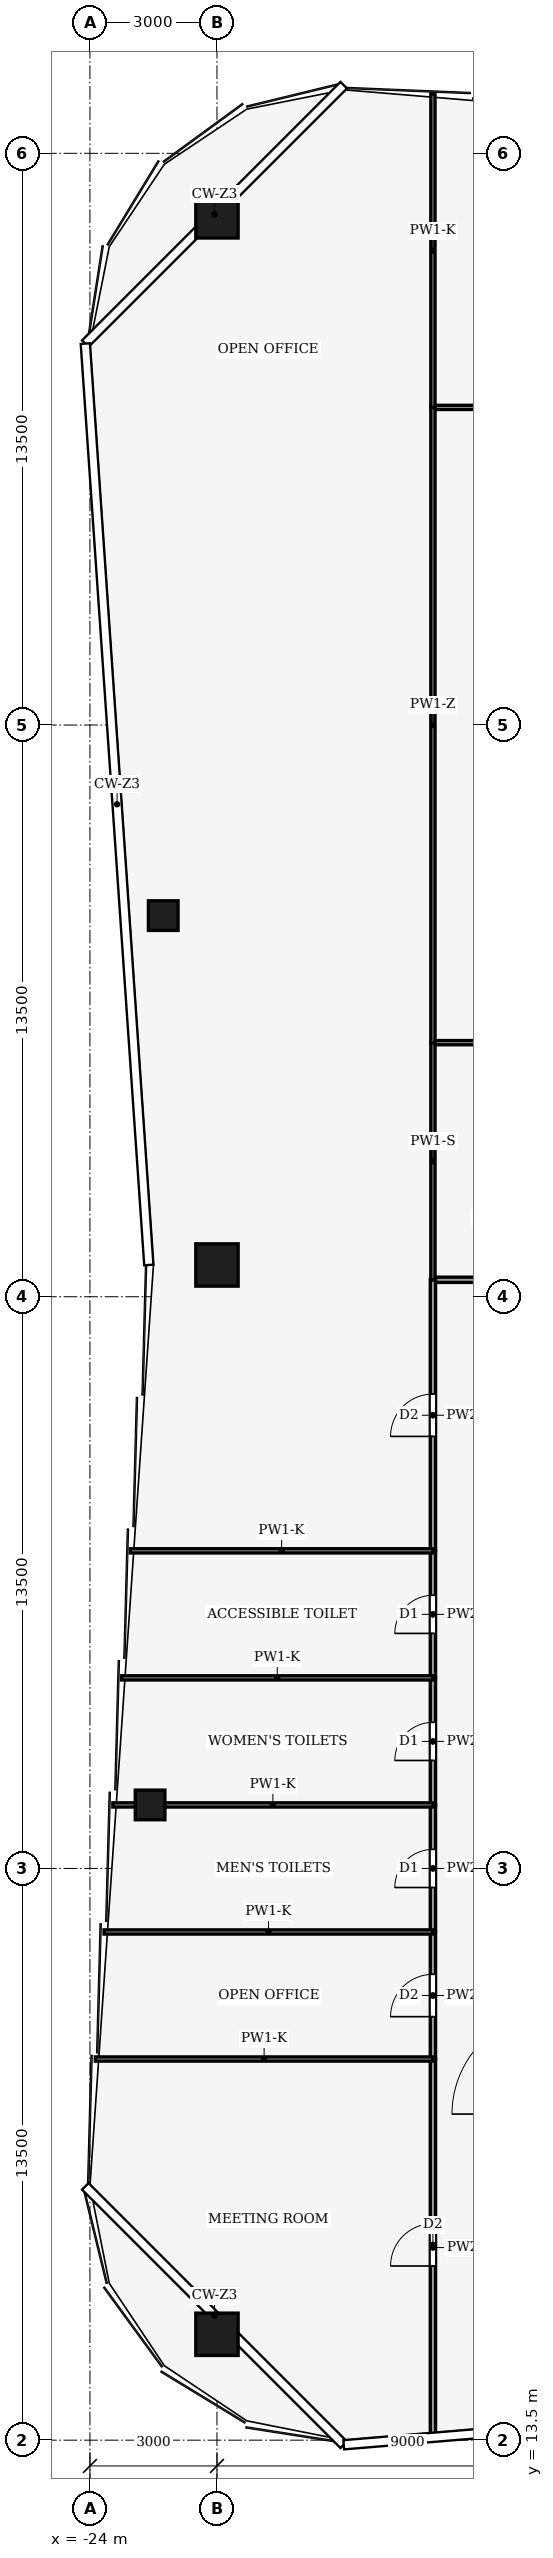
"""IFC4 building model, lengths in metres.
Left out: names, types, materials, properties, quantities, classifications, styles, units other than length and angle.
Written with IfcOpenShell. Run it as: python <this file> out.ifc"""

import sys

from ifc_helpers import new_model, si_unit, direction, frame, frame_2d, origin, origin_2d, place, context, subcontext, project, spatial, rectangle, hollow_rectangle, extrude, element, fill, save


model = new_model("IFC4")
c1 = context("Model", 3, precision=1e-05, world=origin(), true_north=direction((0.0, 1.0)))
c2 = subcontext(c1, "Body", "Model", "MODEL_VIEW")
j1 = project(units=[si_unit("LENGTHUNIT", "METRE"), si_unit("PLANEANGLEUNIT", "RADIAN")], contexts=[c1])
p1 = place(None, origin())
s1 = spatial("IfcSite", under=j1, at=p1, CompositionType="ELEMENT")
p2 = place(p1, origin())
s2 = spatial("IfcBuilding", under=s1, at=p2, CompositionType="ELEMENT")
p3 = place(p2, frame((0.0, 0.0, 222.0)))
s3 = spatial("IfcBuildingStorey", under=s2, at=p3, CompositionType="ELEMENT", Elevation=222.0)
for number, where, z_axis, x_axis in (
    (1, (-21.0, 66.0, 0.0), (0.0, 0.0, 1.0), (1.0, 0.0, 0.0)),
    (2, (-21.0, 16.0, 0.0), (0.0, 0.0, 1.0), (1.0, 0.0, 0.0)),
    (3, (-21.0, 41.25, 0.0), (0.0, 0.0, 1.0), (1.0, 0.0, 0.0)),
):
    element("IfcColumn", number, at=place(p3, frame(where, z_axis=z_axis, x_axis=x_axis)), inside=s3, PredefinedType="COLUMN", context=c2, shape_type="SweptSolid", body=[
        extrude(hollow_rectangle(XDim=1.0, YDim=1.0, WallThickness=0.06, at=origin_2d()), origin(), (0.0, 0.0, 1.0), 4.0),
    ])
for number, where, z_axis, x_axis in (
    (4, (-22.579, 28.5, 0.0), (0.0, 0.0, 1.0), (1.0, 0.0, 0.0)),
    (5, (-22.269, 49.5, 0.0), (0.0, 0.0, 1.0), (1.0, 0.0, 0.0)),
):
    element("IfcColumn", number, at=place(p3, frame(where, z_axis=z_axis, x_axis=x_axis)), inside=s3, PredefinedType="COLUMN", context=c2, shape_type="SweptSolid", body=[
        extrude(hollow_rectangle(XDim=0.7, YDim=0.7, WallThickness=0.03, at=origin_2d()), origin(), (0.0, 0.0, 1.0), 4.0),
    ])
p4 = place(p3, frame((-15.9, 40.9, 0.0), z_axis=(0.0, 0.0, 1.0), x_axis=(1.0, 0.0, 0.0)))
e6 = element("IfcWall", 6, at=p4, inside=s3, PredefinedType="PARTITIONING", context=c2, shape_type="SweptSolid", body=[
    extrude(rectangle(XDim=3.9, YDim=0.125, at=frame_2d((1.95, 0.0))), origin(), (0.0, 0.0, 1.0), 3.32),
])
p5 = place(p4, frame((1.45, 0.0, 0.0)))
e7 = element("IfcOpeningElement", 7, at=p5, cuts=e6, PredefinedType="OPENING", context=c2, shape_type="SweptSolid", body=[
    extrude(rectangle(XDim=1.0, YDim=2.1, at=frame_2d((0.5, 1.05))), frame((0.0, 0.073, 0.0), z_axis=(0.0, -1.0, 0.0), x_axis=(1.0, 0.0, 0.0)), (0.0, 0.0, 1.0), 0.145),
])
p6 = place(p3, frame((-15.9, 13.595, 0.0), z_axis=(0.0, 0.0, 1.0), x_axis=(0.0, 1.0, 0.0)))
e8 = element("IfcWall", 8, at=p6, inside=s3, PredefinedType="PARTITIONING", context=c2, shape_type="SweptSolid", body=[
    extrude(rectangle(XDim=8.905, YDim=0.125, at=frame_2d((4.453, 0.0))), origin(), (0.0, 0.0, 1.0), 2.92),
])
p7 = place(p6, frame((4.018, 0.0, 0.0)))
e9 = element("IfcOpeningElement", 9, at=p7, cuts=e8, PredefinedType="OPENING", context=c2, shape_type="SweptSolid", body=[
    extrude(rectangle(XDim=1.0, YDim=2.1, at=frame_2d((0.5, 1.05))), frame((0.0, 0.073, 0.0), z_axis=(0.0, -1.0, 0.0), x_axis=(1.0, 0.0, 0.0)), (0.0, 0.0, 1.0), 0.145),
])
p8 = place(p3, frame((-15.9, 22.5, 0.0), z_axis=(0.0, 0.0, 1.0), x_axis=(0.0, 1.0, 0.0)))
e10 = element("IfcWall", 10, at=p8, inside=s3, PredefinedType="PARTITIONING", context=c2, shape_type="SweptSolid", body=[
    extrude(rectangle(XDim=3.0, YDim=0.125, at=frame_2d((1.5, 0.0))), origin(), (0.0, 0.0, 1.0), 3.32),
])
p9 = place(p8, frame((1.0, 0.0, 0.0)))
e11 = element("IfcOpeningElement", 11, at=p9, cuts=e10, PredefinedType="OPENING", context=c2, shape_type="SweptSolid", body=[
    extrude(rectangle(XDim=1.0, YDim=2.1, at=frame_2d((0.5, 1.05))), frame((0.0, 0.073, 0.0), z_axis=(0.0, -1.0, 0.0), x_axis=(1.0, 0.0, 0.0)), (0.0, 0.0, 1.0), 0.145),
])
p10 = place(p3, frame((-15.9, 25.5, 0.0), z_axis=(0.0, 0.0, 1.0), x_axis=(0.0, 1.0, 0.0)))
e12 = element("IfcWall", 12, at=p10, inside=s3, PredefinedType="PARTITIONING", context=c2, shape_type="SweptSolid", body=[
    extrude(rectangle(XDim=3.0, YDim=0.125, at=frame_2d((1.5, 0.0))), origin(), (0.0, 0.0, 1.0), 3.75),
])
p11 = place(p10, frame((1.05, 0.0, 0.0)))
e13 = element("IfcOpeningElement", 13, at=p11, cuts=e12, PredefinedType="OPENING", context=c2, shape_type="SweptSolid", body=[
    extrude(rectangle(XDim=0.9, YDim=2.1, at=frame_2d((0.45, 1.05))), frame((0.0, 0.073, 0.0), z_axis=(0.0, -1.0, 0.0), x_axis=(1.0, 0.0, 0.0)), (0.0, 0.0, 1.0), 0.145),
])
p12 = place(p3, frame((-15.9, 28.5, 0.0), z_axis=(0.0, 0.0, 1.0), x_axis=(0.0, 1.0, 0.0)))
e14 = element("IfcWall", 14, at=p12, inside=s3, PredefinedType="PARTITIONING", context=c2, shape_type="SweptSolid", body=[
    extrude(rectangle(XDim=3.0, YDim=0.125, at=frame_2d((1.5, 0.0))), origin(), (0.0, 0.0, 1.0), 3.75),
])
p13 = place(p12, frame((1.05, 0.0, 0.0)))
e15 = element("IfcOpeningElement", 15, at=p13, cuts=e14, PredefinedType="OPENING", context=c2, shape_type="SweptSolid", body=[
    extrude(rectangle(XDim=0.9, YDim=2.1, at=frame_2d((0.45, 1.05))), frame((0.0, 0.073, 0.0), z_axis=(0.0, -1.0, 0.0), x_axis=(1.0, 0.0, 0.0)), (0.0, 0.0, 1.0), 0.145),
])
p14 = place(p3, frame((-15.9, 31.5, 0.0), z_axis=(0.0, 0.0, 1.0), x_axis=(0.0, 1.0, 0.0)))
e16 = element("IfcWall", 16, at=p14, inside=s3, PredefinedType="PARTITIONING", context=c2, shape_type="SweptSolid", body=[
    extrude(rectangle(XDim=3.0, YDim=0.125, at=frame_2d((1.5, 0.0))), origin(), (0.0, 0.0, 1.0), 3.75),
])
p15 = place(p14, frame((1.05, 0.0, 0.0)))
e17 = element("IfcOpeningElement", 17, at=p15, cuts=e16, PredefinedType="OPENING", context=c2, shape_type="SweptSolid", body=[
    extrude(rectangle(XDim=0.9, YDim=2.1, at=frame_2d((0.45, 1.05))), frame((0.0, 0.073, 0.0), z_axis=(0.0, -1.0, 0.0), x_axis=(1.0, 0.0, 0.0)), (0.0, 0.0, 1.0), 0.145),
])
p16 = place(p3, frame((-15.9, 34.5, 0.0), z_axis=(0.0, 0.0, 1.0), x_axis=(0.0, 1.0, 0.0)))
e18 = element("IfcWall", 18, at=p16, inside=s3, PredefinedType="PARTITIONING", context=c2, shape_type="SweptSolid", body=[
    extrude(rectangle(XDim=6.404, YDim=0.125, at=frame_2d((3.202, 0.0))), origin(), (0.0, 0.0, 1.0), 3.02),
])
p17 = place(p16, frame((2.702, 0.0, 0.0)))
e19 = element("IfcOpeningElement", 19, at=p17, cuts=e18, PredefinedType="OPENING", context=c2, shape_type="SweptSolid", body=[
    extrude(rectangle(XDim=1.0, YDim=2.1, at=frame_2d((0.5, 1.05))), frame((0.0, 0.073, 0.0), z_axis=(0.0, -1.0, 0.0), x_axis=(1.0, 0.0, 0.0)), (0.0, 0.0, 1.0), 0.145),
])
p18 = place(p3, frame((-11.996, 46.5, 0.0), z_axis=(0.0, 0.0, 1.0), x_axis=(-1.0, 0.0, 0.0)))
e20 = element("IfcWall", 20, at=p18, inside=s3, PredefinedType="PARTITIONING", context=c2, shape_type="SweptSolid", body=[
    extrude(rectangle(XDim=3.904, YDim=0.1, at=frame_2d((1.952, 0.0))), origin(), (0.0, 0.0, 1.0), 3.75),
])
p19 = place(p3, frame((-15.9, 46.504, 0.0), z_axis=(0.0, 0.0, 1.0), x_axis=(0.0, -1.0, 0.0)))
e21 = element("IfcWall", 21, at=p19, inside=s3, PredefinedType="PARTITIONING", context=c2, shape_type="SweptSolid", body=[
    extrude(rectangle(XDim=5.608, YDim=0.1, at=frame_2d((2.804, 0.0))), origin(), (0.0, 0.0, 1.0), 3.32),
])
p20 = place(p3, frame((-15.9, 61.5, 0.0), z_axis=(0.0, 0.0, 1.0), x_axis=(1.0, 0.0, 0.0)))
e22 = element("IfcWall", 22, at=p20, inside=s3, PredefinedType="PARTITIONING", context=c2, shape_type="SweptSolid", body=[
    extrude(rectangle(XDim=9.9, YDim=0.1, at=frame_2d((4.95, 0.0))), origin(), (0.0, 0.0, 1.0), 3.12),
])
p21 = place(p20, frame((4.45, 0.0, 0.0)))
e23 = element("IfcOpeningElement", 23, at=p21, cuts=e22, PredefinedType="OPENING", context=c2, shape_type="SweptSolid", body=[
    extrude(rectangle(XDim=1.0, YDim=2.1, at=frame_2d((0.5, 1.05))), frame((0.0, 0.06, 0.0), z_axis=(0.0, -1.0, 0.0), x_axis=(1.0, 0.0, 0.0)), (0.0, 0.0, 1.0), 0.12),
])
p22 = place(p3, frame((-15.9, 61.504, 0.0), z_axis=(0.0, 0.0, 1.0), x_axis=(0.0, -1.0, 0.0)))
e24 = element("IfcWall", 24, at=p22, inside=s3, PredefinedType="PARTITIONING", context=c2, shape_type="SweptSolid", body=[
    extrude(rectangle(XDim=15.008, YDim=0.1, at=frame_2d((7.504, 0.0))), origin(), (0.0, 0.0, 1.0), 3.12),
])
p23 = place(p3, frame((-15.9, 68.905, 0.0), z_axis=(0.0, 0.0, 1.0), x_axis=(0.0, -1.0, 0.0)))
e25 = element("IfcWall", 25, at=p23, inside=s3, PredefinedType="PARTITIONING", context=c2, shape_type="SweptSolid", body=[
    extrude(rectangle(XDim=7.409, YDim=0.1, at=frame_2d((3.705, 0.0))), origin(), (0.0, 0.0, 1.0), 2.92),
])
p24 = place(p3, frame((-15.9, 22.5, 0.0), z_axis=(0.0, 0.0, 1.0), x_axis=(-1.0, 0.0, 0.0)))
e26 = element("IfcWall", 26, at=p24, inside=s3, PredefinedType="PARTITIONING", context=c2, shape_type="SweptSolid", body=[
    extrude(rectangle(XDim=7.973, YDim=0.1, at=frame_2d((3.987, 0.0))), origin(), (0.0, 0.0, 1.0), 2.92),
])
p25 = place(p3, frame((-15.9, 25.5, 0.0), z_axis=(0.0, 0.0, 1.0), x_axis=(-1.0, 0.0, 0.0)))
e27 = element("IfcWall", 27, at=p25, inside=s3, PredefinedType="PARTITIONING", context=c2, shape_type="SweptSolid", body=[
    extrude(rectangle(XDim=7.766, YDim=0.1, at=frame_2d((3.883, 0.0))), origin(), (0.0, 0.0, 1.0), 2.92),
])
p26 = place(p3, frame((-15.9, 28.5, 0.0), z_axis=(0.0, 0.0, 1.0), x_axis=(-1.0, 0.0, 0.0)))
e28 = element("IfcWall", 28, at=p26, inside=s3, PredefinedType="PARTITIONING", context=c2, shape_type="SweptSolid", body=[
    extrude(rectangle(XDim=7.559, YDim=0.1, at=frame_2d((3.78, 0.0))), origin(), (0.0, 0.0, 1.0), 2.92),
])
p27 = place(p3, frame((-15.9, 31.5, 0.0), z_axis=(0.0, 0.0, 1.0), x_axis=(-1.0, 0.0, 0.0)))
e29 = element("IfcWall", 29, at=p27, inside=s3, PredefinedType="PARTITIONING", context=c2, shape_type="SweptSolid", body=[
    extrude(rectangle(XDim=7.353, YDim=0.1, at=frame_2d((3.676, 0.0))), origin(), (0.0, 0.0, 1.0), 2.92),
])
p28 = place(p3, frame((-15.9, 34.5, 0.0), z_axis=(0.0, 0.0, 1.0), x_axis=(-1.0, 0.0, 0.0)))
e30 = element("IfcWall", 30, at=p28, inside=s3, PredefinedType="PARTITIONING", context=c2, shape_type="SweptSolid", body=[
    extrude(rectangle(XDim=7.146, YDim=0.1, at=frame_2d((3.573, 0.0))), origin(), (0.0, 0.0, 1.0), 2.92),
])
p29 = place(p7, origin())
e31 = element("IfcDoor", 31, at=p29, inside=s3, OperationType="SINGLE_SWING_RIGHT", PredefinedType="DOOR", context=c2, shape_type="SweptSolid", body=[
    extrude(rectangle(XDim=1.0, YDim=2.1, at=frame_2d((0.5, 1.05))), frame((0.0, 0.025, 0.0), z_axis=(0.0, -1.0, 0.0), x_axis=(1.0, 0.0, 0.0)), (0.0, 0.0, 1.0), 0.05),
])
fill(e9, e31)
p30 = place(p9, origin())
e32 = element("IfcDoor", 32, at=p30, inside=s3, OperationType="SINGLE_SWING_LEFT", PredefinedType="DOOR", context=c2, shape_type="SweptSolid", body=[
    extrude(rectangle(XDim=1.0, YDim=2.1, at=frame_2d((0.5, 1.05))), frame((0.0, 0.025, 0.0), z_axis=(0.0, -1.0, 0.0), x_axis=(1.0, 0.0, 0.0)), (0.0, 0.0, 1.0), 0.05),
])
fill(e11, e32)
p31 = place(p11, origin())
e33 = element("IfcDoor", 33, at=p31, inside=s3, OperationType="SINGLE_SWING_RIGHT", PredefinedType="DOOR", context=c2, shape_type="SweptSolid", body=[
    extrude(rectangle(XDim=0.9, YDim=2.1, at=frame_2d((0.45, 1.05))), frame((0.0, 0.025, 0.0), z_axis=(0.0, -1.0, 0.0), x_axis=(1.0, 0.0, 0.0)), (0.0, 0.0, 1.0), 0.05),
])
fill(e13, e33)
p32 = place(p13, origin())
e34 = element("IfcDoor", 34, at=p32, inside=s3, OperationType="SINGLE_SWING_LEFT", PredefinedType="DOOR", context=c2, shape_type="SweptSolid", body=[
    extrude(rectangle(XDim=0.9, YDim=2.1, at=frame_2d((0.45, 1.05))), frame((0.0, 0.025, 0.0), z_axis=(0.0, -1.0, 0.0), x_axis=(1.0, 0.0, 0.0)), (0.0, 0.0, 1.0), 0.05),
])
fill(e15, e34)
p33 = place(p15, origin())
e35 = element("IfcDoor", 35, at=p33, inside=s3, OperationType="SINGLE_SWING_RIGHT", PredefinedType="DOOR", context=c2, shape_type="SweptSolid", body=[
    extrude(rectangle(XDim=0.9, YDim=2.1, at=frame_2d((0.45, 1.05))), frame((0.0, 0.025, 0.0), z_axis=(0.0, -1.0, 0.0), x_axis=(1.0, 0.0, 0.0)), (0.0, 0.0, 1.0), 0.05),
])
fill(e17, e35)
p34 = place(p17, origin())
e36 = element("IfcDoor", 36, at=p34, inside=s3, OperationType="SINGLE_SWING_LEFT", PredefinedType="DOOR", context=c2, shape_type="SweptSolid", body=[
    extrude(rectangle(XDim=1.0, YDim=2.1, at=frame_2d((0.5, 1.05))), frame((0.0, 0.025, 0.0), z_axis=(0.0, -1.0, 0.0), x_axis=(1.0, 0.0, 0.0)), (0.0, 0.0, 1.0), 0.05),
])
fill(e19, e36)
save(model, sys.argv[1])
